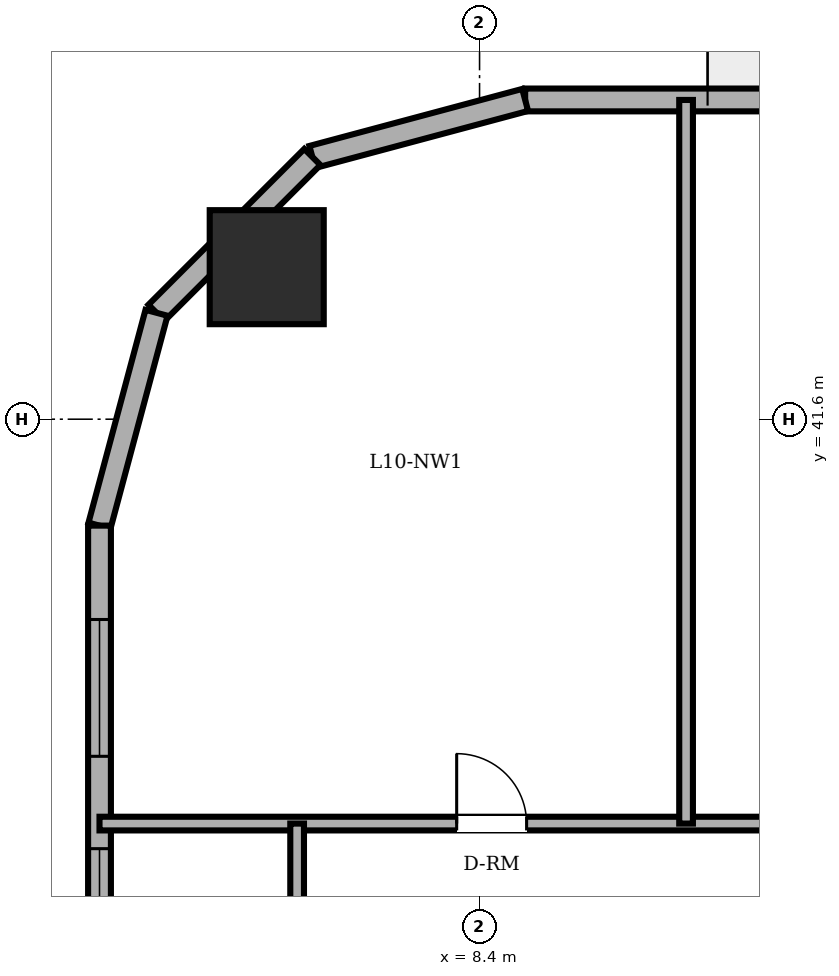
"""IFC4 building model, lengths in metres.
Left out: names, types, materials, properties, quantities, classifications, styles, units other than length and angle.
Written with IfcOpenShell. Run it as: python <this file> out.ifc"""

import sys

from ifc_helpers import new_model, si_unit, direction, frame, frame_2d, origin, origin_2d, place, context, subcontext, project, spatial, rectangle, circle, extrude, element, fill, save


model = new_model("IFC4")
c1 = context("Model", 3, precision=1e-05, world=origin(), true_north=direction((0.0, 1.0)))
c2 = subcontext(c1, "Body", "Model", "MODEL_VIEW")
j1 = project(units=[si_unit("LENGTHUNIT", "METRE"), si_unit("PLANEANGLEUNIT", "RADIAN")], contexts=[c1])
p1 = place(None, origin())
s1 = spatial("IfcSite", under=j1, at=p1, CompositionType="ELEMENT")
p2 = place(p1, origin())
s2 = spatial("IfcBuilding", under=s1, at=p2, CompositionType="ELEMENT")
p3 = place(p2, frame((0.0, 0.0, 39.6)))
s3 = spatial("IfcBuildingStorey", under=s2, at=p3, CompositionType="ELEMENT", Elevation=39.6)
p4 = place(p3, frame((5.6, 43.6, 0.0), z_axis=(0.0, 0.0, 1.0), x_axis=(1.0, 0.0, 0.0)))
e1 = element("IfcColumn", 1, at=p4, inside=s3, PredefinedType="COLUMN", context=c2, shape_type="SweptSolid", body=[
    extrude(circle(Radius=0.75, at=origin_2d()), origin(), (0.0, 0.0, 1.0), 3.6),
])
p5 = place(p3, frame((39.079, 45.8, 0.0), z_axis=(0.0, 0.0, 1.0), x_axis=(-1.0, 0.0, 0.0)))
e2 = element("IfcWall", 2, at=p5, inside=s3, PredefinedType="SOLIDWALL", context=c2, shape_type="SweptSolid", body=[
    extrude(rectangle(XDim=30.079, YDim=0.3, at=frame_2d((15.04, 0.0))), origin(), (0.0, 0.0, 1.0), 3.4),
])
p6 = place(p5, frame((16.504, 0.0, 0.0)))
e3 = element("IfcOpeningElement", 3, at=p6, cuts=e2, PredefinedType="OPENING", context=c2, shape_type="SweptSolid", body=[
    extrude(rectangle(XDim=0.95, YDim=2.2, at=frame_2d((0.475, 1.1))), frame((0.0, 0.16, 0.0), z_axis=(0.0, -1.0, 0.0), x_axis=(1.0, 0.0, 0.0)), (0.0, 0.0, 1.0), 0.32),
])
p7 = place(p5, frame((2.226, 0.0, 0.85)))
e4 = element("IfcOpeningElement", 4, at=p7, cuts=e2, PredefinedType="OPENING", context=c2, shape_type="SweptSolid", body=[
    extrude(rectangle(XDim=1.8, YDim=1.55, at=frame_2d((0.9, 0.775))), frame((0.0, 0.16, 0.0), z_axis=(0.0, -1.0, 0.0), x_axis=(1.0, 0.0, 0.0)), (0.0, 0.0, 1.0), 0.32),
])
p8 = place(p5, frame((5.003, 0.0, 0.85)))
e5 = element("IfcOpeningElement", 5, at=p8, cuts=e2, PredefinedType="OPENING", context=c2, shape_type="SweptSolid", body=[
    extrude(rectangle(XDim=1.8, YDim=1.55, at=frame_2d((0.9, 0.775))), frame((0.0, 0.16, 0.0), z_axis=(0.0, -1.0, 0.0), x_axis=(1.0, 0.0, 0.0)), (0.0, 0.0, 1.0), 0.32),
])
p9 = place(p5, frame((10.179, 0.0, 0.85)))
e6 = element("IfcOpeningElement", 6, at=p9, cuts=e2, PredefinedType="OPENING", context=c2, shape_type="SweptSolid", body=[
    extrude(rectangle(XDim=1.8, YDim=1.55, at=frame_2d((0.9, 0.775))), frame((0.0, 0.16, 0.0), z_axis=(0.0, -1.0, 0.0), x_axis=(1.0, 0.0, 0.0)), (0.0, 0.0, 1.0), 0.32),
])
p10 = place(p5, frame((12.579, 0.0, 0.85)))
e7 = element("IfcOpeningElement", 7, at=p10, cuts=e2, PredefinedType="OPENING", context=c2, shape_type="SweptSolid", body=[
    extrude(rectangle(XDim=1.8, YDim=1.55, at=frame_2d((0.9, 0.775))), frame((0.0, 0.16, 0.0), z_axis=(0.0, -1.0, 0.0), x_axis=(1.0, 0.0, 0.0)), (0.0, 0.0, 1.0), 0.32),
])
p11 = place(p5, frame((19.007, 0.0, 0.85)))
e8 = element("IfcOpeningElement", 8, at=p11, cuts=e2, PredefinedType="OPENING", context=c2, shape_type="SweptSolid", body=[
    extrude(rectangle(XDim=1.8, YDim=1.55, at=frame_2d((0.9, 0.775))), frame((0.0, 0.16, 0.0), z_axis=(0.0, -1.0, 0.0), x_axis=(1.0, 0.0, 0.0)), (0.0, 0.0, 1.0), 0.32),
])
p12 = place(p5, frame((23.034, 0.0, 0.85)))
e9 = element("IfcOpeningElement", 9, at=p12, cuts=e2, PredefinedType="OPENING", context=c2, shape_type="SweptSolid", body=[
    extrude(rectangle(XDim=1.8, YDim=1.55, at=frame_2d((0.9, 0.775))), frame((0.0, 0.16, 0.0), z_axis=(0.0, -1.0, 0.0), x_axis=(1.0, 0.0, 0.0)), (0.0, 0.0, 1.0), 0.32),
])
p13 = place(p3, frame((9.0, 45.8, 0.0), z_axis=(0.0, 0.0, 1.0), x_axis=(-0.96594917914, -0.258731875344, 0.0)))
e10 = element("IfcWall", 10, at=p13, inside=s3, PredefinedType="SOLIDWALL", context=c2, shape_type="SweptSolid", body=[
    extrude(rectangle(XDim=2.899, YDim=0.3, at=frame_2d((1.449, 0.0))), origin(), (0.0, 0.0, 1.0), 3.4),
])
p14 = place(p3, frame((6.2, 45.05, 0.0), z_axis=(0.0, 0.0, 1.0), x_axis=(-0.707106781187, -0.707106781187, 0.0)))
e11 = element("IfcWall", 11, at=p14, inside=s3, PredefinedType="SOLIDWALL", context=c2, shape_type="SweptSolid", body=[
    extrude(rectangle(XDim=2.899, YDim=0.3, at=frame_2d((1.45, 0.0))), origin(), (0.0, 0.0, 1.0), 3.4),
])
p15 = place(p3, frame((4.15, 43.0, 0.0), z_axis=(0.0, 0.0, 1.0), x_axis=(-0.258731875344, -0.96594917914, 0.0)))
e12 = element("IfcWall", 12, at=p15, inside=s3, PredefinedType="SOLIDWALL", context=c2, shape_type="SweptSolid", body=[
    extrude(rectangle(XDim=2.899, YDim=0.3, at=frame_2d((1.449, 0.0))), origin(), (0.0, 0.0, 1.0), 3.4),
])
p16 = place(p3, frame((3.4, 40.2, 0.0), z_axis=(0.0, 0.0, 1.0), x_axis=(0.0, -1.0, 0.0)))
e13 = element("IfcWall", 13, at=p16, inside=s3, PredefinedType="SOLIDWALL", context=c2, shape_type="SweptSolid", body=[
    extrude(rectangle(XDim=32.4, YDim=0.3, at=frame_2d((16.2, 0.0))), origin(), (0.0, 0.0, 1.0), 3.4),
])
p17 = place(p16, frame((1.235, 0.0, 0.85)))
e14 = element("IfcOpeningElement", 14, at=p17, cuts=e13, PredefinedType="OPENING", context=c2, shape_type="SweptSolid", body=[
    extrude(rectangle(XDim=1.8, YDim=1.55, at=frame_2d((0.9, 0.775))), frame((0.0, 0.16, 0.0), z_axis=(0.0, -1.0, 0.0), x_axis=(1.0, 0.0, 0.0)), (0.0, 0.0, 1.0), 0.32),
])
p18 = place(p16, frame((4.25, 0.0, 0.85)))
e15 = element("IfcOpeningElement", 15, at=p18, cuts=e13, PredefinedType="OPENING", context=c2, shape_type="SweptSolid", body=[
    extrude(rectangle(XDim=1.8, YDim=1.55, at=frame_2d((0.9, 0.775))), frame((0.0, 0.16, 0.0), z_axis=(0.0, -1.0, 0.0), x_axis=(1.0, 0.0, 0.0)), (0.0, 0.0, 1.0), 0.32),
])
p19 = place(p16, frame((9.253, 0.0, 0.85)))
e16 = element("IfcOpeningElement", 16, at=p19, cuts=e13, PredefinedType="OPENING", context=c2, shape_type="SweptSolid", body=[
    extrude(rectangle(XDim=1.8, YDim=1.55, at=frame_2d((0.9, 0.775))), frame((0.0, 0.16, 0.0), z_axis=(0.0, -1.0, 0.0), x_axis=(1.0, 0.0, 0.0)), (0.0, 0.0, 1.0), 0.32),
])
p20 = place(p16, frame((13.027, 0.0, 0.85)))
e17 = element("IfcOpeningElement", 17, at=p20, cuts=e13, PredefinedType="OPENING", context=c2, shape_type="SweptSolid", body=[
    extrude(rectangle(XDim=1.8, YDim=1.55, at=frame_2d((0.9, 0.775))), frame((0.0, 0.16, 0.0), z_axis=(0.0, -1.0, 0.0), x_axis=(1.0, 0.0, 0.0)), (0.0, 0.0, 1.0), 0.32),
])
p21 = place(p16, frame((19.573, 0.0, 0.85)))
e18 = element("IfcOpeningElement", 18, at=p21, cuts=e13, PredefinedType="OPENING", context=c2, shape_type="SweptSolid", body=[
    extrude(rectangle(XDim=1.8, YDim=1.55, at=frame_2d((0.9, 0.775))), frame((0.0, 0.16, 0.0), z_axis=(0.0, -1.0, 0.0), x_axis=(1.0, 0.0, 0.0)), (0.0, 0.0, 1.0), 0.32),
])
p22 = place(p16, frame((22.347, 0.0, 0.85)))
e19 = element("IfcOpeningElement", 19, at=p22, cuts=e13, PredefinedType="OPENING", context=c2, shape_type="SweptSolid", body=[
    extrude(rectangle(XDim=1.8, YDim=1.55, at=frame_2d((0.9, 0.775))), frame((0.0, 0.16, 0.0), z_axis=(0.0, -1.0, 0.0), x_axis=(1.0, 0.0, 0.0)), (0.0, 0.0, 1.0), 0.32),
])
p23 = place(p16, frame((26.35, 0.0, 0.85)))
e20 = element("IfcOpeningElement", 20, at=p23, cuts=e13, PredefinedType="OPENING", context=c2, shape_type="SweptSolid", body=[
    extrude(rectangle(XDim=1.8, YDim=1.55, at=frame_2d((0.9, 0.775))), frame((0.0, 0.16, 0.0), z_axis=(0.0, -1.0, 0.0), x_axis=(1.0, 0.0, 0.0)), (0.0, 0.0, 1.0), 0.32),
])
p24 = place(p16, frame((29.365, 0.0, 0.85)))
e21 = element("IfcOpeningElement", 21, at=p24, cuts=e13, PredefinedType="OPENING", context=c2, shape_type="SweptSolid", body=[
    extrude(rectangle(XDim=1.8, YDim=1.55, at=frame_2d((0.9, 0.775))), frame((0.0, 0.16, 0.0), z_axis=(0.0, -1.0, 0.0), x_axis=(1.0, 0.0, 0.0)), (0.0, 0.0, 1.0), 0.32),
])
p25 = place(p3, frame((3.4, 36.28, 0.0), z_axis=(0.0, 0.0, 1.0), x_axis=(1.0, 0.0, 0.0)))
e22 = element("IfcWall", 22, at=p25, inside=s3, PredefinedType="PARTITIONING", context=c2, shape_type="SweptSolid", body=[
    extrude(rectangle(XDim=47.689, YDim=0.18, at=frame_2d((23.845, 0.0))), origin(), (0.0, 0.0, 1.0), 3.4),
])
p26 = place(p25, frame((21.05, 0.0, 0.0)))
e23 = element("IfcOpeningElement", 23, at=p26, cuts=e22, PredefinedType="OPENING", context=c2, shape_type="SweptSolid", body=[
    extrude(rectangle(XDim=0.9, YDim=2.1, at=frame_2d((0.45, 1.05))), frame((0.0, 0.1, 0.0), z_axis=(0.0, -1.0, 0.0), x_axis=(1.0, 0.0, 0.0)), (0.0, 0.0, 1.0), 0.2),
])
p27 = place(p25, frame((24.67, 0.0, 0.0)))
e24 = element("IfcOpeningElement", 24, at=p27, cuts=e22, PredefinedType="OPENING", context=c2, shape_type="SweptSolid", body=[
    extrude(rectangle(XDim=0.86, YDim=2.1, at=frame_2d((0.43, 1.05))), frame((0.0, 0.1, 0.0), z_axis=(0.0, -1.0, 0.0), x_axis=(1.0, 0.0, 0.0)), (0.0, 0.0, 1.0), 0.2),
])
p28 = place(p25, frame((40.39, 0.0, 0.0)))
e25 = element("IfcOpeningElement", 25, at=p28, cuts=e22, PredefinedType="OPENING", context=c2, shape_type="SweptSolid", body=[
    extrude(rectangle(XDim=0.92, YDim=2.1, at=frame_2d((0.46, 1.05))), frame((0.0, 0.1, 0.0), z_axis=(0.0, -1.0, 0.0), x_axis=(1.0, 0.0, 0.0)), (0.0, 0.0, 1.0), 0.2),
])
p29 = place(p25, frame((4.699, 0.0, 0.0)))
e26 = element("IfcOpeningElement", 26, at=p29, cuts=e22, PredefinedType="OPENING", context=c2, shape_type="SweptSolid", body=[
    extrude(rectangle(XDim=0.92, YDim=2.1, at=frame_2d((0.46, 1.05))), frame((0.0, 0.1, 0.0), z_axis=(0.0, -1.0, 0.0), x_axis=(1.0, 0.0, 0.0)), (0.0, 0.0, 1.0), 0.2),
])
p30 = place(p25, frame((13.298, 0.0, 0.0)))
e27 = element("IfcOpeningElement", 27, at=p30, cuts=e22, PredefinedType="OPENING", context=c2, shape_type="SweptSolid", body=[
    extrude(rectangle(XDim=0.92, YDim=2.1, at=frame_2d((0.46, 1.05))), frame((0.0, 0.1, 0.0), z_axis=(0.0, -1.0, 0.0), x_axis=(1.0, 0.0, 0.0)), (0.0, 0.0, 1.0), 0.2),
])
p31 = place(p25, frame((32.215, 0.0, 0.0)))
e28 = element("IfcOpeningElement", 28, at=p31, cuts=e22, PredefinedType="OPENING", context=c2, shape_type="SweptSolid", body=[
    extrude(rectangle(XDim=0.92, YDim=2.1, at=frame_2d((0.46, 1.05))), frame((0.0, 0.1, 0.0), z_axis=(0.0, -1.0, 0.0), x_axis=(1.0, 0.0, 0.0)), (0.0, 0.0, 1.0), 0.2),
])
p32 = place(p3, frame((6.0, 33.82, 0.0), z_axis=(0.0, 0.0, 1.0), x_axis=(0.0, 1.0, 0.0)))
e29 = element("IfcWall", 29, at=p32, inside=s3, PredefinedType="PARTITIONING", context=c2, shape_type="SweptSolid", body=[
    extrude(rectangle(XDim=2.46, YDim=0.18, at=frame_2d((1.23, 0.0))), origin(), (0.0, 0.0, 1.0), 3.4),
])
p33 = place(p3, frame((11.117, 36.28, 0.0), z_axis=(0.0, 0.0, 1.0), x_axis=(0.0, 1.0, 0.0)))
e30 = element("IfcWall", 30, at=p33, inside=s3, PredefinedType="PARTITIONING", context=c2, shape_type="SweptSolid", body=[
    extrude(rectangle(XDim=9.52, YDim=0.18, at=frame_2d((4.76, 0.0))), origin(), (0.0, 0.0, 1.0), 3.4),
])
p34 = place(p17, origin())
e31 = element("IfcWindow", 31, at=p34, inside=s3, PartitioningType="DOUBLE_PANEL_VERTICAL", PredefinedType="WINDOW", context=c2, shape_type="SweptSolid", body=[
    extrude(rectangle(XDim=1.8, YDim=1.55, at=frame_2d((0.9, 0.775))), frame((0.0, 0.03, 0.0), z_axis=(0.0, -1.0, 0.0), x_axis=(1.0, 0.0, 0.0)), (0.0, 0.0, 1.0), 0.06),
])
fill(e14, e31)
p35 = place(p18, origin())
e32 = element("IfcWindow", 32, at=p35, inside=s3, PartitioningType="DOUBLE_PANEL_VERTICAL", PredefinedType="WINDOW", context=c2, shape_type="SweptSolid", body=[
    extrude(rectangle(XDim=1.8, YDim=1.55, at=frame_2d((0.9, 0.775))), frame((0.0, 0.03, 0.0), z_axis=(0.0, -1.0, 0.0), x_axis=(1.0, 0.0, 0.0)), (0.0, 0.0, 1.0), 0.06),
])
fill(e15, e32)
p36 = place(p29, origin())
e33 = element("IfcDoor", 33, at=p36, inside=s3, OperationType="SINGLE_SWING_LEFT", PredefinedType="DOOR", context=c2, shape_type="SweptSolid", body=[
    extrude(rectangle(XDim=0.92, YDim=2.1, at=frame_2d((0.46, 1.05))), frame((0.0, 0.025, 0.0), z_axis=(0.0, -1.0, 0.0), x_axis=(1.0, 0.0, 0.0)), (0.0, 0.0, 1.0), 0.05),
])
fill(e26, e33)
save(model, sys.argv[1])
